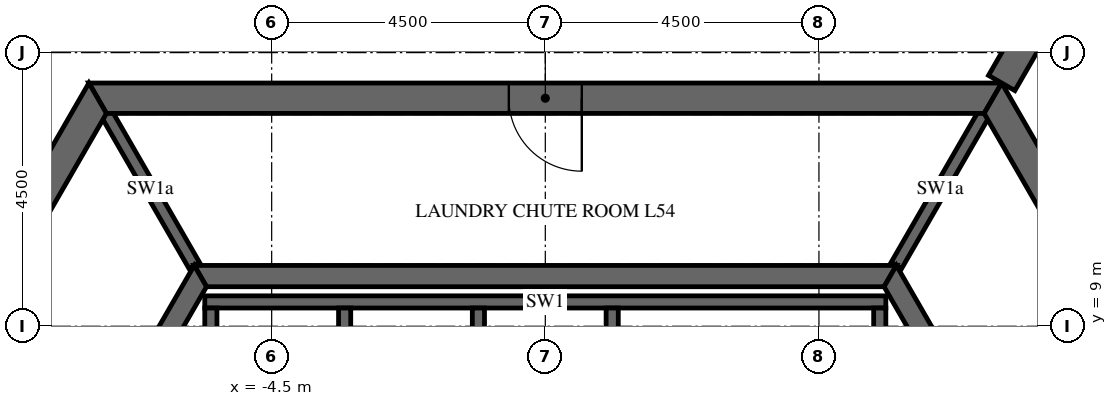
"""IFC4 building model, lengths in metres.
Left out: names, types, materials, properties, quantities, classifications, styles, units other than length and angle.
Written with IfcOpenShell. Run it as: python <this file> out.ifc"""

import sys

from ifc_helpers import new_model, si_unit, direction, frame, frame_2d, origin, place, context, subcontext, project, spatial, polyline, rectangle, outline, extrude, element, fill, save


model = new_model("IFC4")
c1 = context("Model", 3, precision=1e-05, world=origin(), true_north=direction((0.0, 1.0)))
c2 = subcontext(c1, "Body", "Model", "MODEL_VIEW")
j1 = project(units=[si_unit("LENGTHUNIT", "METRE"), si_unit("PLANEANGLEUNIT", "RADIAN")], contexts=[c1])
p1 = place(None, origin())
s1 = spatial("IfcSite", under=j1, at=p1, CompositionType="ELEMENT")
p2 = place(p1, origin())
s2 = spatial("IfcBuilding", under=s1, at=p2, CompositionType="ELEMENT")
p3 = place(p2, frame((0.0, 0.0, 226.8)))
s3 = spatial("IfcBuildingStorey", under=s2, at=p3, CompositionType="ELEMENT", Elevation=226.8)
p4 = place(p3, frame((-7.361, 12.75, -0.15), z_axis=(0.0, 0.0, 1.0), x_axis=(-0.50000571537, -0.866022103989, 0.0)))
e1 = element("IfcWall", 1, at=p4, inside=s3, PredefinedType="SHEAR", context=c2, shape_type="SweptSolid", body=[
    extrude(outline(polyline([(-0.144, -0.25), (14.867, -0.25), (14.578, 0.25), (0.144, 0.25), (-0.144, -0.25)])), origin(), (0.0, 0.0, 1.0), 3.9),
])
p5 = place(p4, frame((6.49, 0.0, 0.15)))
e2 = element("IfcOpeningElement", 2, at=p5, cuts=e1, PredefinedType="OPENING", context=c2, shape_type="SweptSolid", body=[
    extrude(rectangle(XDim=1.8, YDim=2.4, at=frame_2d((0.9, 1.2))), frame((0.0, 0.26, 0.0), z_axis=(0.0, -1.0, 0.0), x_axis=(1.0, 0.0, 0.0)), (0.0, 0.0, 1.0), 0.52),
])
p6 = place(p3, frame((14.722, 0.0, -0.15), z_axis=(0.0, 0.0, 1.0), x_axis=(-0.50000571537, 0.866022103989, 0.0)))
e3 = element("IfcWall", 3, at=p6, inside=s3, PredefinedType="SHEAR", context=c2, shape_type="SweptSolid", body=[
    extrude(outline(polyline([(-0.144, -0.25), (14.867, -0.25), (14.578, 0.25), (0.144, 0.25), (-0.144, -0.25)])), origin(), (0.0, 0.0, 1.0), 3.9),
])
p7 = place(p6, frame((6.432, 0.0, 0.15)))
e4 = element("IfcOpeningElement", 4, at=p7, cuts=e3, PredefinedType="OPENING", context=c2, shape_type="SweptSolid", body=[
    extrude(rectangle(XDim=1.8, YDim=2.4, at=frame_2d((0.9, 1.2))), frame((0.0, 0.26, 0.0), z_axis=(0.0, -1.0, 0.0), x_axis=(1.0, 0.0, 0.0)), (0.0, 0.0, 1.0), 0.52),
])
p8 = place(p3, frame((7.361, 12.75, -0.15), z_axis=(0.0, 0.0, 1.0), x_axis=(-1.0, 0.0, 0.0)))
e5 = element("IfcWall", 5, at=p8, inside=s3, PredefinedType="SHEAR", context=c2, shape_type="SweptSolid", body=[
    extrude(outline(polyline([(-0.144, -0.25), (14.866, -0.25), (14.578, 0.25), (0.144, 0.25), (-0.144, -0.25)])), origin(), (0.0, 0.0, 1.0), 3.9),
])
p9 = place(p8, frame((6.761, 0.0, 0.15)))
e6 = element("IfcOpeningElement", 6, at=p9, cuts=e5, PredefinedType="OPENING", context=c2, shape_type="SweptSolid", body=[
    extrude(rectangle(XDim=1.2, YDim=2.4, at=frame_2d((0.6, 1.2))), frame((0.0, 0.26, 0.0), z_axis=(0.0, -1.0, 0.0), x_axis=(1.0, 0.0, 0.0)), (0.0, 0.0, 1.0), 0.52),
])
p10 = place(p3, frame((7.506, 13.0, -0.15), z_axis=(0.0, 0.0, 1.0), x_axis=(0.499988271576, 0.866032175087, 0.0)))
e7 = element("IfcWall", 7, at=p10, inside=s3, PredefinedType="SHEAR", context=c2, shape_type="SweptSolid", body=[
    extrude(rectangle(XDim=15.424, YDim=0.5, at=frame_2d((7.712, 0.0))), origin(), (0.0, 0.0, 1.0), 3.9),
])
p11 = place(p10, frame((6.812, 0.0, 0.15)))
e8 = element("IfcOpeningElement", 8, at=p11, cuts=e7, PredefinedType="OPENING", context=c2, shape_type="SweptSolid", body=[
    extrude(rectangle(XDim=1.8, YDim=2.4, at=frame_2d((0.9, 1.2))), frame((0.0, 0.26, 0.0), z_axis=(0.0, -1.0, 0.0), x_axis=(1.0, 0.0, 0.0)), (0.0, 0.0, 1.0), 0.52),
])
p12 = place(p3, frame((-5.673, 9.825, -0.15), z_axis=(0.0, 0.0, 1.0), x_axis=(-0.499995046907, -0.866028263435, 0.0)))
e9 = element("IfcWall", 9, at=p12, inside=s3, PredefinedType="SHEAR", context=c2, shape_type="SweptSolid", body=[
    extrude(outline(polyline([(-0.101, -0.175), (11.446, -0.175), (11.244, 0.175), (0.101, 0.175), (-0.101, -0.175)])), origin(), (0.0, 0.0, 1.0), 3.9),
])
p13 = place(p12, frame((4.801, 0.0, 0.15)))
e10 = element("IfcOpeningElement", 10, at=p13, cuts=e9, PredefinedType="OPENING", context=c2, shape_type="SweptSolid", body=[
    extrude(rectangle(XDim=1.8, YDim=2.4, at=frame_2d((0.9, 1.2))), frame((0.0, 0.185, 0.0), z_axis=(0.0, -1.0, 0.0), x_axis=(1.0, 0.0, 0.0)), (0.0, 0.0, 1.0), 0.37),
])
p14 = place(p3, frame((11.345, 0.0, -0.15), z_axis=(0.0, 0.0, 1.0), x_axis=(-0.499995046907, 0.866028263435, 0.0)))
e11 = element("IfcWall", 11, at=p14, inside=s3, PredefinedType="SHEAR", context=c2, shape_type="SweptSolid", body=[
    extrude(outline(polyline([(-0.101, -0.175), (11.446, -0.175), (11.244, 0.175), (0.101, 0.175), (-0.101, -0.175)])), origin(), (0.0, 0.0, 1.0), 3.9),
])
p15 = place(p14, frame((4.744, 0.0, 0.15)))
e12 = element("IfcOpeningElement", 12, at=p15, cuts=e11, PredefinedType="OPENING", context=c2, shape_type="SweptSolid", body=[
    extrude(rectangle(XDim=1.8, YDim=2.4, at=frame_2d((0.9, 1.2))), frame((0.0, 0.185, 0.0), z_axis=(0.0, -1.0, 0.0), x_axis=(1.0, 0.0, 0.0)), (0.0, 0.0, 1.0), 0.37),
])
p16 = place(p3, frame((5.673, 9.825, -0.15), z_axis=(0.0, 0.0, 1.0), x_axis=(-1.0, 0.0, 0.0)))
e13 = element("IfcWall", 13, at=p16, inside=s3, PredefinedType="SHEAR", context=c2, shape_type="SweptSolid", body=[
    extrude(outline(polyline([(-0.101, -0.175), (11.446, -0.175), (11.244, 0.175), (0.101, 0.175), (-0.101, -0.175)])), origin(), (0.0, 0.0, 1.0), 3.9),
])
p17 = place(p3, frame((-5.6, 9.4, -0.25), z_axis=(0.0, 0.0, 1.0), x_axis=(1.0, 0.0, 0.0)))
e14 = element("IfcWall", 14, at=p17, inside=s3, PredefinedType="SHEAR", context=c2, shape_type="SweptSolid", body=[
    extrude(rectangle(XDim=11.2, YDim=0.2, at=frame_2d((5.6, 0.0))), origin(), (0.0, 0.0, 1.0), 3.9),
])
for number, where, z_axis, x_axis in (
    (15, (-5.5, 6.4, -0.25), (0.0, 0.0, 1.0), (0.0, 1.0, 0.0)),
    (16, (-3.3, 6.4, -0.25), (0.0, 0.0, 1.0), (0.0, 1.0, 0.0)),
    (17, (-1.1, 6.4, -0.25), (0.0, 0.0, 1.0), (0.0, 1.0, 0.0)),
    (18, (1.1, 6.4, -0.25), (0.0, 0.0, 1.0), (0.0, 1.0, 0.0)),
    (19, (5.5, 6.4, -0.25), (0.0, 0.0, 1.0), (0.0, 1.0, 0.0)),
):
    element("IfcWall", number, at=place(p3, frame(where, z_axis=z_axis, x_axis=x_axis)), inside=s3, PredefinedType="SHEAR", context=c2, shape_type="SweptSolid", body=[
        extrude(rectangle(XDim=2.9, YDim=0.2, at=frame_2d((1.45, 0.0))), origin(), (0.0, 0.0, 1.0), 3.9),
    ])
for number, where, z_axis, x_axis in (
    (20, (5.773, 10.0, -0.15), (0.0, 0.0, 1.0), (0.5, 0.866, 0.0)),
    (21, (-5.773, 10.0, -0.15), (0.0, 0.0, 1.0), (-0.5, 0.866, 0.0)),
):
    element("IfcWall", number, at=place(p3, frame(where, z_axis=z_axis, x_axis=x_axis)), inside=s3, PredefinedType="SHEAR", context=c2, shape_type="SweptSolid", body=[
        extrude(rectangle(XDim=2.887, YDim=0.2, at=frame_2d((1.443, 0.0))), origin(), (0.0, 0.0, 1.0), 3.9),
    ])
p18 = place(p9, origin())
e22 = element("IfcDoor", 22, at=p18, inside=s3, OperationType="SINGLE_SWING_LEFT", PredefinedType="DOOR", context=c2, shape_type="SweptSolid", body=[
    extrude(rectangle(XDim=1.2, YDim=2.4, at=frame_2d((0.6, 1.2))), frame((0.0, 0.025, 0.0), z_axis=(0.0, -1.0, 0.0), x_axis=(1.0, 0.0, 0.0)), (0.0, 0.0, 1.0), 0.05),
])
fill(e6, e22)
save(model, sys.argv[1])
